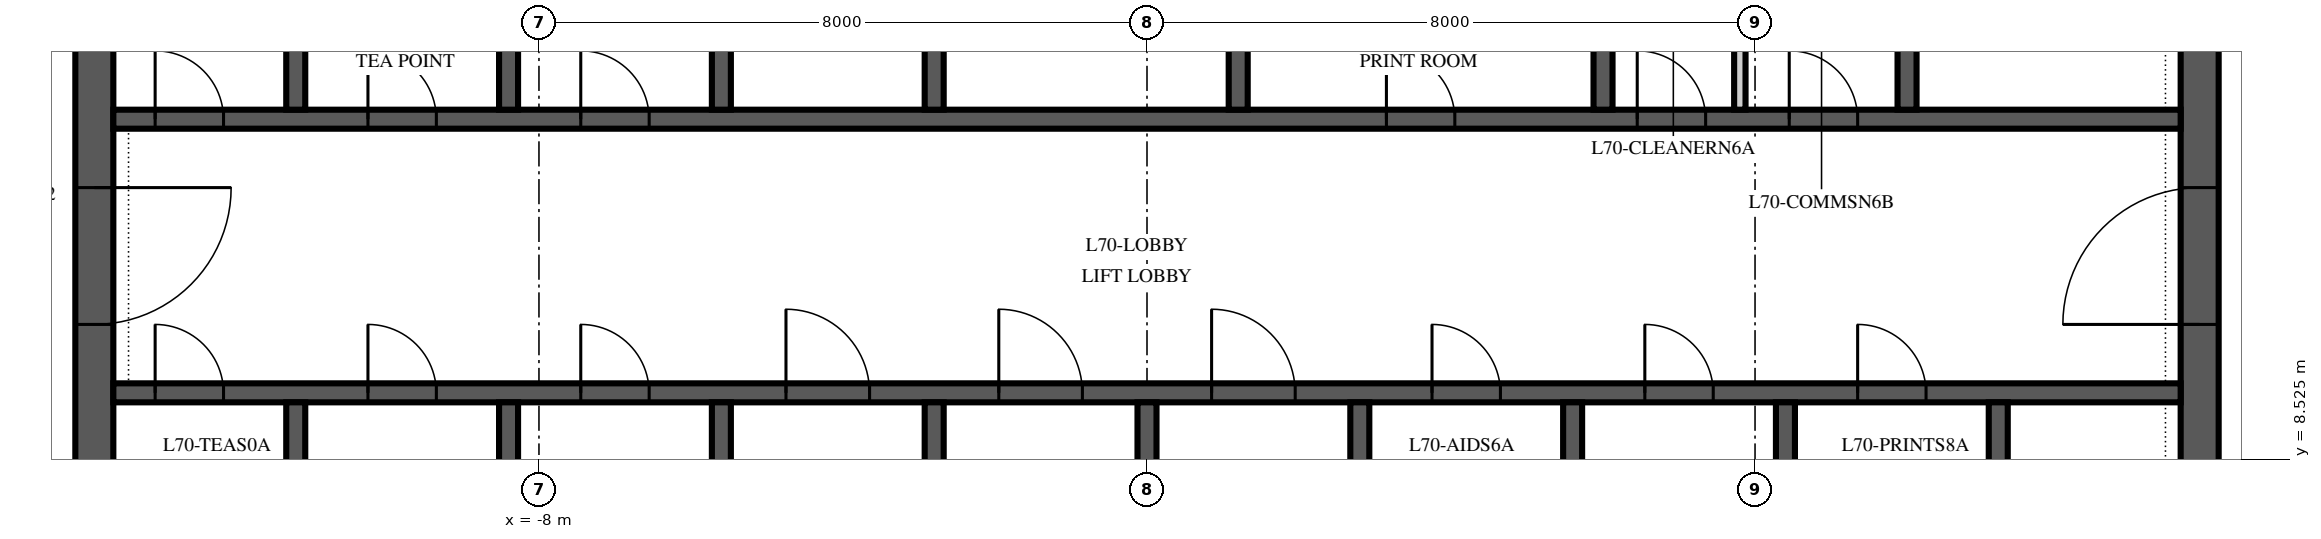
"""IFC4 building model, lengths in metres.
Left out: names, types, materials, properties, quantities, classifications, styles, units other than length and angle.
Written with IfcOpenShell. Run it as: python <this file> out.ifc"""

import sys

from ifc_helpers import new_model, si_unit, direction, frame, frame_2d, origin, place, context, subcontext, project, spatial, polyline, rectangle, outline, extrude, element, fill, save


model = new_model("IFC4")
c1 = context("Model", 3, precision=1e-05, world=origin(), true_north=direction((0.0, 1.0)))
c2 = subcontext(c1, "Body", "Model", "MODEL_VIEW")
j1 = project(units=[si_unit("LENGTHUNIT", "METRE"), si_unit("PLANEANGLEUNIT", "RADIAN")], contexts=[c1])
p1 = place(None, origin())
s1 = spatial("IfcSite", under=j1, at=p1, CompositionType="ELEMENT")
p2 = place(p1, origin())
s2 = spatial("IfcBuilding", under=s1, at=p2, CompositionType="ELEMENT")
p3 = place(p2, frame((0.0, 0.0, 300.0)))
s3 = spatial("IfcBuildingStorey", under=s2, at=p3, CompositionType="ELEMENT", Elevation=300.0)
p4 = place(p3, frame((13.85, 6.15, 0.0), z_axis=(0.0, 0.0, 1.0), x_axis=(0.0, 1.0, 0.0)))
e1 = element("IfcWall", 1, at=p4, inside=s3, PredefinedType="SHEAR", context=c2, shape_type="SweptSolid", body=[
    extrude(outline(polyline([(0.0, -0.25), (17.7, -0.25), (17.7, 0.0), (17.45, 0.0), (17.45, 0.25), (0.25, 0.25), (0.25, 0.0), (0.0, 0.0), (0.0, -0.25)])), origin(), (0.0, 0.0, 1.0), 4.0),
])
p5 = place(p4, frame((4.15, 0.0, 0.0)))
e2 = element("IfcOpeningElement", 2, at=p5, cuts=e1, PredefinedType="OPENING", context=c2, shape_type="SweptSolid", body=[
    extrude(rectangle(XDim=1.8, YDim=2.4, at=frame_2d((0.9, 1.2))), frame((0.0, 0.265, 0.0), z_axis=(0.0, -1.0, 0.0), x_axis=(1.0, 0.0, 0.0)), (0.0, 0.0, 1.0), 0.53),
])
p6 = place(p3, frame((-13.85, 23.85, 0.0), z_axis=(0.0, 0.0, 1.0), x_axis=(0.0, -1.0, 0.0)))
e3 = element("IfcWall", 3, at=p6, inside=s3, PredefinedType="SHEAR", context=c2, shape_type="SweptSolid", body=[
    extrude(outline(polyline([(0.0, -0.25), (17.7, -0.25), (17.7, 0.0), (17.45, 0.0), (17.45, 0.25), (0.25, 0.25), (0.25, 0.0), (0.0, 0.0), (0.0, -0.25)])), origin(), (0.0, 0.0, 1.0), 4.0),
])
p7 = place(p6, frame((11.75, 0.0, 0.0)))
e4 = element("IfcOpeningElement", 4, at=p7, cuts=e3, PredefinedType="OPENING", context=c2, shape_type="SweptSolid", body=[
    extrude(rectangle(XDim=1.8, YDim=2.4, at=frame_2d((0.9, 1.2))), frame((0.0, 0.265, 0.0), z_axis=(0.0, -1.0, 0.0), x_axis=(1.0, 0.0, 0.0)), (0.0, 0.0, 1.0), 0.53),
])
p8 = place(p3, frame((-13.6, 9.4, 0.0), z_axis=(0.0, 0.0, 1.0), x_axis=(1.0, 0.0, 0.0)))
e5 = element("IfcWall", 5, at=p8, inside=s3, PredefinedType="SHEAR", context=c2, shape_type="SweptSolid", body=[
    extrude(rectangle(XDim=27.2, YDim=0.25, at=frame_2d((13.6, 0.0))), origin(), (0.0, 0.0, 1.0), 4.0),
])
p9 = place(p8, frame((8.85, 0.0, 0.0)))
e6 = element("IfcOpeningElement", 6, at=p9, cuts=e5, PredefinedType="OPENING", context=c2, shape_type="SweptSolid", body=[
    extrude(rectangle(XDim=1.1, YDim=2.1, at=frame_2d((0.55, 1.05))), frame((0.0, 0.14, 0.0), z_axis=(0.0, -1.0, 0.0), x_axis=(1.0, 0.0, 0.0)), (0.0, 0.0, 1.0), 0.28),
])
p10 = place(p8, frame((11.65, 0.0, 0.0)))
e7 = element("IfcOpeningElement", 7, at=p10, cuts=e5, PredefinedType="OPENING", context=c2, shape_type="SweptSolid", body=[
    extrude(rectangle(XDim=1.1, YDim=2.1, at=frame_2d((0.55, 1.05))), frame((0.0, 0.14, 0.0), z_axis=(0.0, -1.0, 0.0), x_axis=(1.0, 0.0, 0.0)), (0.0, 0.0, 1.0), 0.28),
])
p11 = place(p8, frame((14.45, 0.0, 0.0)))
e8 = element("IfcOpeningElement", 8, at=p11, cuts=e5, PredefinedType="OPENING", context=c2, shape_type="SweptSolid", body=[
    extrude(rectangle(XDim=1.1, YDim=2.1, at=frame_2d((0.55, 1.05))), frame((0.0, 0.14, 0.0), z_axis=(0.0, -1.0, 0.0), x_axis=(1.0, 0.0, 0.0)), (0.0, 0.0, 1.0), 0.28),
])
p12 = place(p8, frame((0.55, 0.0, 0.0)))
e9 = element("IfcOpeningElement", 9, at=p12, cuts=e5, PredefinedType="OPENING", context=c2, shape_type="SweptSolid", body=[
    extrude(rectangle(XDim=0.9, YDim=2.1, at=frame_2d((0.45, 1.05))), frame((0.0, 0.14, 0.0), z_axis=(0.0, -1.0, 0.0), x_axis=(1.0, 0.0, 0.0)), (0.0, 0.0, 1.0), 0.28),
])
p13 = place(p8, frame((3.35, 0.0, 0.0)))
e10 = element("IfcOpeningElement", 10, at=p13, cuts=e5, PredefinedType="OPENING", context=c2, shape_type="SweptSolid", body=[
    extrude(rectangle(XDim=0.9, YDim=2.1, at=frame_2d((0.45, 1.05))), frame((0.0, 0.14, 0.0), z_axis=(0.0, -1.0, 0.0), x_axis=(1.0, 0.0, 0.0)), (0.0, 0.0, 1.0), 0.28),
])
p14 = place(p8, frame((6.15, 0.0, 0.0)))
e11 = element("IfcOpeningElement", 11, at=p14, cuts=e5, PredefinedType="OPENING", context=c2, shape_type="SweptSolid", body=[
    extrude(rectangle(XDim=0.9, YDim=2.1, at=frame_2d((0.45, 1.05))), frame((0.0, 0.14, 0.0), z_axis=(0.0, -1.0, 0.0), x_axis=(1.0, 0.0, 0.0)), (0.0, 0.0, 1.0), 0.28),
])
p15 = place(p8, frame((17.35, 0.0, 0.0)))
e12 = element("IfcOpeningElement", 12, at=p15, cuts=e5, PredefinedType="OPENING", context=c2, shape_type="SweptSolid", body=[
    extrude(rectangle(XDim=0.9, YDim=2.1, at=frame_2d((0.45, 1.05))), frame((0.0, 0.14, 0.0), z_axis=(0.0, -1.0, 0.0), x_axis=(1.0, 0.0, 0.0)), (0.0, 0.0, 1.0), 0.28),
])
p16 = place(p8, frame((20.15, 0.0, 0.0)))
e13 = element("IfcOpeningElement", 13, at=p16, cuts=e5, PredefinedType="OPENING", context=c2, shape_type="SweptSolid", body=[
    extrude(rectangle(XDim=0.9, YDim=2.1, at=frame_2d((0.45, 1.05))), frame((0.0, 0.14, 0.0), z_axis=(0.0, -1.0, 0.0), x_axis=(1.0, 0.0, 0.0)), (0.0, 0.0, 1.0), 0.28),
])
p17 = place(p8, frame((22.95, 0.0, 0.0)))
e14 = element("IfcOpeningElement", 14, at=p17, cuts=e5, PredefinedType="OPENING", context=c2, shape_type="SweptSolid", body=[
    extrude(rectangle(XDim=0.9, YDim=2.1, at=frame_2d((0.45, 1.05))), frame((0.0, 0.14, 0.0), z_axis=(0.0, -1.0, 0.0), x_axis=(1.0, 0.0, 0.0)), (0.0, 0.0, 1.0), 0.28),
])
p18 = place(p3, frame((-13.6, 13.0, 0.0), z_axis=(0.0, 0.0, 1.0), x_axis=(1.0, 0.0, 0.0)))
e15 = element("IfcWall", 15, at=p18, inside=s3, PredefinedType="SHEAR", context=c2, shape_type="SweptSolid", body=[
    extrude(rectangle(XDim=27.2, YDim=0.25, at=frame_2d((13.6, 0.0))), origin(), (0.0, 0.0, 1.0), 4.0),
])
p19 = place(p18, frame((16.75, 0.0, 0.0)))
e16 = element("IfcOpeningElement", 16, at=p19, cuts=e15, PredefinedType="OPENING", context=c2, shape_type="SweptSolid", body=[
    extrude(rectangle(XDim=0.9, YDim=2.1, at=frame_2d((0.45, 1.05))), frame((0.0, 0.14, 0.0), z_axis=(0.0, -1.0, 0.0), x_axis=(1.0, 0.0, 0.0)), (0.0, 0.0, 1.0), 0.28),
])
p20 = place(p18, frame((20.05, 0.0, 0.0)))
e17 = element("IfcOpeningElement", 17, at=p20, cuts=e15, PredefinedType="OPENING", context=c2, shape_type="SweptSolid", body=[
    extrude(rectangle(XDim=0.9, YDim=2.1, at=frame_2d((0.45, 1.05))), frame((0.0, 0.14, 0.0), z_axis=(0.0, -1.0, 0.0), x_axis=(1.0, 0.0, 0.0)), (0.0, 0.0, 1.0), 0.28),
])
p21 = place(p18, frame((22.05, 0.0, 0.0)))
e18 = element("IfcOpeningElement", 18, at=p21, cuts=e15, PredefinedType="OPENING", context=c2, shape_type="SweptSolid", body=[
    extrude(rectangle(XDim=0.9, YDim=2.1, at=frame_2d((0.45, 1.05))), frame((0.0, 0.14, 0.0), z_axis=(0.0, -1.0, 0.0), x_axis=(1.0, 0.0, 0.0)), (0.0, 0.0, 1.0), 0.28),
])
p22 = place(p18, frame((0.55, 0.0, 0.0)))
e19 = element("IfcOpeningElement", 19, at=p22, cuts=e15, PredefinedType="OPENING", context=c2, shape_type="SweptSolid", body=[
    extrude(rectangle(XDim=0.9, YDim=2.1, at=frame_2d((0.45, 1.05))), frame((0.0, 0.14, 0.0), z_axis=(0.0, -1.0, 0.0), x_axis=(1.0, 0.0, 0.0)), (0.0, 0.0, 1.0), 0.28),
])
p23 = place(p18, frame((3.35, 0.0, 0.0)))
e20 = element("IfcOpeningElement", 20, at=p23, cuts=e15, PredefinedType="OPENING", context=c2, shape_type="SweptSolid", body=[
    extrude(rectangle(XDim=0.9, YDim=2.1, at=frame_2d((0.45, 1.05))), frame((0.0, 0.14, 0.0), z_axis=(0.0, -1.0, 0.0), x_axis=(1.0, 0.0, 0.0)), (0.0, 0.0, 1.0), 0.28),
])
p24 = place(p18, frame((6.15, 0.0, 0.0)))
e21 = element("IfcOpeningElement", 21, at=p24, cuts=e15, PredefinedType="OPENING", context=c2, shape_type="SweptSolid", body=[
    extrude(rectangle(XDim=0.9, YDim=2.1, at=frame_2d((0.45, 1.05))), frame((0.0, 0.14, 0.0), z_axis=(0.0, -1.0, 0.0), x_axis=(1.0, 0.0, 0.0)), (0.0, 0.0, 1.0), 0.28),
])
for number, where, z_axis, x_axis in (
    (22, (-11.2, 6.4, 0.0), (0.0, 0.0, 1.0), (0.0, 1.0, 0.0)),
    (23, (-8.4, 6.4, 0.0), (0.0, 0.0, 1.0), (0.0, 1.0, 0.0)),
    (24, (-5.6, 6.4, 0.0), (0.0, 0.0, 1.0), (0.0, 1.0, 0.0)),
    (25, (-2.8, 6.4, 0.0), (0.0, 0.0, 1.0), (0.0, 1.0, 0.0)),
    (26, (0.0, 6.4, 0.0), (0.0, 0.0, 1.0), (0.0, 1.0, 0.0)),
    (27, (2.8, 6.4, 0.0), (0.0, 0.0, 1.0), (0.0, 1.0, 0.0)),
    (28, (5.6, 6.4, 0.0), (0.0, 0.0, 1.0), (0.0, 1.0, 0.0)),
    (29, (8.4, 6.4, 0.0), (0.0, 0.0, 1.0), (0.0, 1.0, 0.0)),
    (30, (11.2, 6.4, 0.0), (0.0, 0.0, 1.0), (0.0, 1.0, 0.0)),
):
    element("IfcWall", number, at=place(p3, frame(where, z_axis=z_axis, x_axis=x_axis)), inside=s3, PredefinedType="SHEAR", context=c2, shape_type="SweptSolid", body=[
        extrude(rectangle(XDim=2.875, YDim=0.25, at=frame_2d((1.438, 0.0))), origin(), (0.0, 0.0, 1.0), 4.0),
    ])
for number, where, z_axis, x_axis in (
    (31, (-11.2, 13.125, 0.0), (0.0, 0.0, 1.0), (0.0, 1.0, 0.0)),
    (32, (-8.4, 13.125, 0.0), (0.0, 0.0, 1.0), (0.0, 1.0, 0.0)),
    (33, (-5.6, 13.125, 0.0), (0.0, 0.0, 1.0), (0.0, 1.0, 0.0)),
    (34, (-2.8, 13.125, 0.0), (0.0, 0.0, 1.0), (0.0, 1.0, 0.0)),
    (35, (1.2, 13.125, 0.0), (0.0, 0.0, 1.0), (0.0, 1.0, 0.0)),
    (36, (6.0, 13.125, 0.0), (0.0, 0.0, 1.0), (0.0, 1.0, 0.0)),
    (37, (10.0, 13.125, 0.0), (0.0, 0.0, 1.0), (0.0, 1.0, 0.0)),
):
    element("IfcWall", number, at=place(p3, frame(where, z_axis=z_axis, x_axis=x_axis)), inside=s3, PredefinedType="SHEAR", context=c2, shape_type="SweptSolid", body=[
        extrude(rectangle(XDim=2.75, YDim=0.25, at=frame_2d((1.375, 0.0))), origin(), (0.0, 0.0, 1.0), 4.0),
    ])
p25 = place(p3, frame((7.8, 13.125, 0.0), z_axis=(0.0, 0.0, 1.0), x_axis=(0.0, 1.0, 0.0)))
e38 = element("IfcWall", 38, at=p25, inside=s3, PredefinedType="PARTITIONING", context=c2, shape_type="SweptSolid", body=[
    extrude(rectangle(XDim=2.75, YDim=0.15, at=frame_2d((1.375, 0.0))), origin(), (0.0, 0.0, 1.0), 3.85),
])
p26 = place(p5, origin())
e39 = element("IfcDoor", 39, at=p26, inside=s3, OperationType="DOUBLE_DOOR_SINGLE_SWING", PredefinedType="DOOR", context=c2, shape_type="SweptSolid", body=[
    extrude(rectangle(XDim=1.8, YDim=2.4, at=frame_2d((0.9, 1.2))), frame((0.0, 0.25, 0.0), z_axis=(0.0, -1.0, 0.0), x_axis=(1.0, 0.0, 0.0)), (0.0, 0.0, 1.0), 0.5),
])
fill(e2, e39)
p27 = place(p7, origin())
e40 = element("IfcDoor", 40, at=p27, inside=s3, OperationType="DOUBLE_DOOR_SINGLE_SWING", PredefinedType="DOOR", context=c2, shape_type="SweptSolid", body=[
    extrude(rectangle(XDim=1.8, YDim=2.4, at=frame_2d((0.9, 1.2))), frame((0.0, 0.25, 0.0), z_axis=(0.0, -1.0, 0.0), x_axis=(1.0, 0.0, 0.0)), (0.0, 0.0, 1.0), 0.5),
])
fill(e4, e40)
p28 = place(p9, origin())
e41 = element("IfcDoor", 41, at=p28, inside=s3, OperationType="SLIDING_TO_LEFT", PredefinedType="DOOR", context=c2, shape_type="SweptSolid", body=[
    extrude(rectangle(XDim=1.1, YDim=2.1, at=frame_2d((0.55, 1.05))), frame((0.0, 0.125, 0.0), z_axis=(0.0, -1.0, 0.0), x_axis=(1.0, 0.0, 0.0)), (0.0, 0.0, 1.0), 0.25),
])
fill(e6, e41)
p29 = place(p10, origin())
e42 = element("IfcDoor", 42, at=p29, inside=s3, OperationType="SLIDING_TO_LEFT", PredefinedType="DOOR", context=c2, shape_type="SweptSolid", body=[
    extrude(rectangle(XDim=1.1, YDim=2.1, at=frame_2d((0.55, 1.05))), frame((0.0, 0.125, 0.0), z_axis=(0.0, -1.0, 0.0), x_axis=(1.0, 0.0, 0.0)), (0.0, 0.0, 1.0), 0.25),
])
fill(e7, e42)
p30 = place(p11, origin())
e43 = element("IfcDoor", 43, at=p30, inside=s3, OperationType="SLIDING_TO_LEFT", PredefinedType="DOOR", context=c2, shape_type="SweptSolid", body=[
    extrude(rectangle(XDim=1.1, YDim=2.1, at=frame_2d((0.55, 1.05))), frame((0.0, 0.125, 0.0), z_axis=(0.0, -1.0, 0.0), x_axis=(1.0, 0.0, 0.0)), (0.0, 0.0, 1.0), 0.25),
])
fill(e8, e43)
p31 = place(p19, origin())
e44 = element("IfcDoor", 44, at=p31, inside=s3, OperationType="SINGLE_SWING_LEFT", PredefinedType="DOOR", context=c2, shape_type="SweptSolid", body=[
    extrude(rectangle(XDim=0.9, YDim=2.1, at=frame_2d((0.45, 1.05))), frame((0.0, 0.125, 0.0), z_axis=(0.0, -1.0, 0.0), x_axis=(1.0, 0.0, 0.0)), (0.0, 0.0, 1.0), 0.25),
])
fill(e16, e44)
p32 = place(p20, origin())
e45 = element("IfcDoor", 45, at=p32, inside=s3, OperationType="SINGLE_SWING_LEFT", PredefinedType="DOOR", context=c2, shape_type="SweptSolid", body=[
    extrude(rectangle(XDim=0.9, YDim=2.1, at=frame_2d((0.45, 1.05))), frame((0.0, 0.125, 0.0), z_axis=(0.0, -1.0, 0.0), x_axis=(1.0, 0.0, 0.0)), (0.0, 0.0, 1.0), 0.25),
])
fill(e17, e45)
p33 = place(p21, origin())
e46 = element("IfcDoor", 46, at=p33, inside=s3, OperationType="SINGLE_SWING_LEFT", PredefinedType="DOOR", context=c2, shape_type="SweptSolid", body=[
    extrude(rectangle(XDim=0.9, YDim=2.1, at=frame_2d((0.45, 1.05))), frame((0.0, 0.125, 0.0), z_axis=(0.0, -1.0, 0.0), x_axis=(1.0, 0.0, 0.0)), (0.0, 0.0, 1.0), 0.25),
])
fill(e18, e46)
p34 = place(p22, origin())
e47 = element("IfcDoor", 47, at=p34, inside=s3, OperationType="SINGLE_SWING_LEFT", PredefinedType="DOOR", context=c2, shape_type="SweptSolid", body=[
    extrude(rectangle(XDim=0.9, YDim=2.1, at=frame_2d((0.45, 1.05))), frame((0.0, 0.125, 0.0), z_axis=(0.0, -1.0, 0.0), x_axis=(1.0, 0.0, 0.0)), (0.0, 0.0, 1.0), 0.25),
])
fill(e19, e47)
p35 = place(p23, origin())
e48 = element("IfcDoor", 48, at=p35, inside=s3, OperationType="SINGLE_SWING_LEFT", PredefinedType="DOOR", context=c2, shape_type="SweptSolid", body=[
    extrude(rectangle(XDim=0.9, YDim=2.1, at=frame_2d((0.45, 1.05))), frame((0.0, 0.125, 0.0), z_axis=(0.0, -1.0, 0.0), x_axis=(1.0, 0.0, 0.0)), (0.0, 0.0, 1.0), 0.25),
])
fill(e20, e48)
p36 = place(p24, origin())
e49 = element("IfcDoor", 49, at=p36, inside=s3, OperationType="SINGLE_SWING_LEFT", PredefinedType="DOOR", context=c2, shape_type="SweptSolid", body=[
    extrude(rectangle(XDim=0.9, YDim=2.1, at=frame_2d((0.45, 1.05))), frame((0.0, 0.125, 0.0), z_axis=(0.0, -1.0, 0.0), x_axis=(1.0, 0.0, 0.0)), (0.0, 0.0, 1.0), 0.25),
])
fill(e21, e49)
p37 = place(p12, origin())
e50 = element("IfcDoor", 50, at=p37, inside=s3, OperationType="SINGLE_SWING_LEFT", PredefinedType="DOOR", context=c2, shape_type="SweptSolid", body=[
    extrude(rectangle(XDim=0.9, YDim=2.1, at=frame_2d((0.45, 1.05))), frame((0.0, 0.125, 0.0), z_axis=(0.0, -1.0, 0.0), x_axis=(1.0, 0.0, 0.0)), (0.0, 0.0, 1.0), 0.25),
])
fill(e9, e50)
p38 = place(p13, origin())
e51 = element("IfcDoor", 51, at=p38, inside=s3, OperationType="SINGLE_SWING_LEFT", PredefinedType="DOOR", context=c2, shape_type="SweptSolid", body=[
    extrude(rectangle(XDim=0.9, YDim=2.1, at=frame_2d((0.45, 1.05))), frame((0.0, 0.125, 0.0), z_axis=(0.0, -1.0, 0.0), x_axis=(1.0, 0.0, 0.0)), (0.0, 0.0, 1.0), 0.25),
])
fill(e10, e51)
p39 = place(p14, origin())
e52 = element("IfcDoor", 52, at=p39, inside=s3, OperationType="SINGLE_SWING_LEFT", PredefinedType="DOOR", context=c2, shape_type="SweptSolid", body=[
    extrude(rectangle(XDim=0.9, YDim=2.1, at=frame_2d((0.45, 1.05))), frame((0.0, 0.125, 0.0), z_axis=(0.0, -1.0, 0.0), x_axis=(1.0, 0.0, 0.0)), (0.0, 0.0, 1.0), 0.25),
])
fill(e11, e52)
p40 = place(p15, origin())
e53 = element("IfcDoor", 53, at=p40, inside=s3, OperationType="SINGLE_SWING_LEFT", PredefinedType="DOOR", context=c2, shape_type="SweptSolid", body=[
    extrude(rectangle(XDim=0.9, YDim=2.1, at=frame_2d((0.45, 1.05))), frame((0.0, 0.125, 0.0), z_axis=(0.0, -1.0, 0.0), x_axis=(1.0, 0.0, 0.0)), (0.0, 0.0, 1.0), 0.25),
])
fill(e12, e53)
p41 = place(p16, origin())
e54 = element("IfcDoor", 54, at=p41, inside=s3, OperationType="SINGLE_SWING_LEFT", PredefinedType="DOOR", context=c2, shape_type="SweptSolid", body=[
    extrude(rectangle(XDim=0.9, YDim=2.1, at=frame_2d((0.45, 1.05))), frame((0.0, 0.125, 0.0), z_axis=(0.0, -1.0, 0.0), x_axis=(1.0, 0.0, 0.0)), (0.0, 0.0, 1.0), 0.25),
])
fill(e13, e54)
p42 = place(p17, origin())
e55 = element("IfcDoor", 55, at=p42, inside=s3, OperationType="SINGLE_SWING_LEFT", PredefinedType="DOOR", context=c2, shape_type="SweptSolid", body=[
    extrude(rectangle(XDim=0.9, YDim=2.1, at=frame_2d((0.45, 1.05))), frame((0.0, 0.125, 0.0), z_axis=(0.0, -1.0, 0.0), x_axis=(1.0, 0.0, 0.0)), (0.0, 0.0, 1.0), 0.25),
])
fill(e14, e55)
save(model, sys.argv[1])
